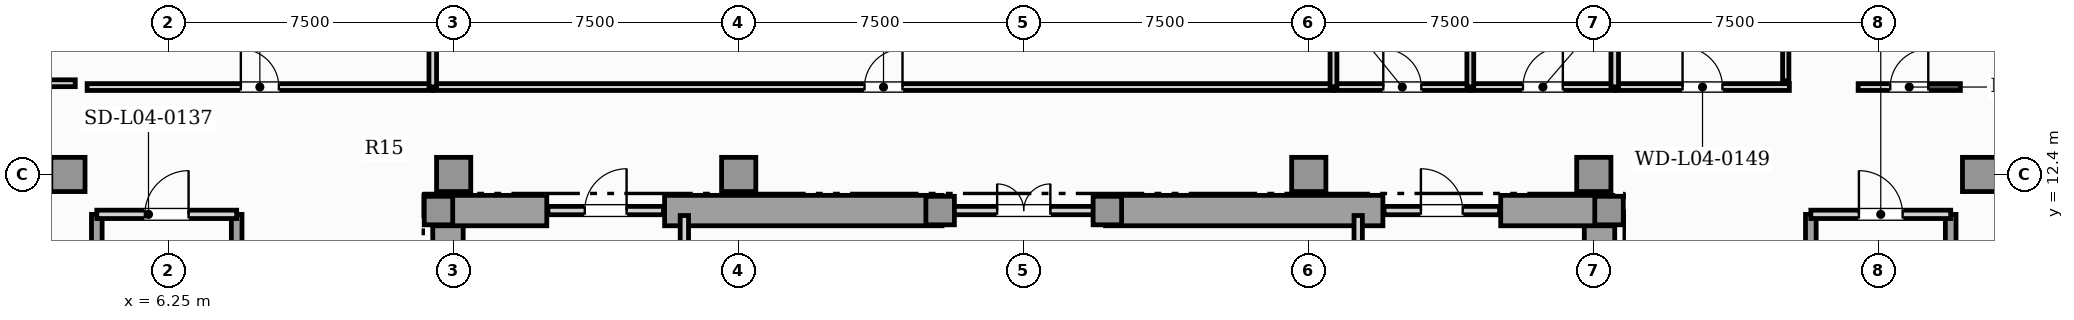
"""IFC4 building model, lengths in metres.
Left out: names, types, materials, properties, quantities, classifications, styles, units other than length and angle.
Written with IfcOpenShell. Run it as: python <this file> out.ifc"""

import sys

from ifc_helpers import new_model, si_unit, direction, frame, frame_2d, origin, origin_2d, place, context, subcontext, project, spatial, rectangle, extrude, element, fill, save


model = new_model("IFC4")
c1 = context("Model", 3, precision=1e-05, world=origin(), true_north=direction((0.0, 1.0)))
c2 = subcontext(c1, "Body", "Model", "MODEL_VIEW")
j1 = project(units=[si_unit("LENGTHUNIT", "METRE"), si_unit("PLANEANGLEUNIT", "RADIAN")], contexts=[c1])
p1 = place(None, origin())
s1 = spatial("IfcSite", under=j1, at=p1, CompositionType="ELEMENT")
p2 = place(p1, origin())
s2 = spatial("IfcBuilding", under=s1, at=p2, CompositionType="ELEMENT")
p3 = place(p2, frame((0.0, 0.0, 19.8)))
s3 = spatial("IfcBuildingStorey", under=s2, at=p3, CompositionType="ELEMENT", Elevation=19.8)
for number, where, z_axis, x_axis in (
    (1, (13.6, 0.92, 0.0), (0.0, 0.0, 1.0), (0.0, 1.0, 0.0)),
    (2, (43.9, 0.92, 0.0), (0.0, 0.0, 1.0), (0.0, 1.0, 0.0)),
):
    element("IfcWall", number, at=place(p3, frame(where, z_axis=z_axis, x_axis=x_axis)), inside=s3, PredefinedType="SHEAR", context=c2, shape_type="SweptSolid", body=[
        extrude(rectangle(XDim=10.53, YDim=0.8, at=frame_2d((5.265, 0.0))), origin(), (0.0, 0.0, 1.0), 4.4),
    ])
p4 = place(p3, frame((13.25, 11.45, 0.0), z_axis=(0.0, 0.0, 1.0), x_axis=(1.0, 0.0, 0.0)))
e3 = element("IfcWall", 3, at=p4, inside=s3, PredefinedType="SHEAR", context=c2, shape_type="SweptSolid", body=[
    extrude(rectangle(XDim=2.95, YDim=0.8, at=frame_2d((1.475, 0.0))), origin(), (0.0, 0.0, 1.0), 4.4),
])
for number, where, z_axis, x_axis in (
    (4, (19.3, 11.45, 0.0), (0.0, 0.0, 1.0), (1.0, 0.0, 0.0)),
    (5, (30.9, 11.45, 0.0), (0.0, 0.0, 1.0), (1.0, 0.0, 0.0)),
):
    element("IfcWall", number, at=place(p3, frame(where, z_axis=z_axis, x_axis=x_axis)), inside=s3, PredefinedType="SHEAR", context=c2, shape_type="SweptSolid", body=[
        extrude(rectangle(XDim=7.3, YDim=0.8, at=frame_2d((3.65, 0.0))), origin(), (0.0, 0.0, 1.0), 4.4),
    ])
p5 = place(p3, frame((41.3, 11.45, 0.0), z_axis=(0.0, 0.0, 1.0), x_axis=(1.0, 0.0, 0.0)))
e6 = element("IfcWall", 6, at=p5, inside=s3, PredefinedType="SHEAR", context=c2, shape_type="SweptSolid", body=[
    extrude(rectangle(XDim=2.95, YDim=0.8, at=frame_2d((1.475, 0.0))), origin(), (0.0, 0.0, 1.0), 4.4),
])
for number, where, z_axis, x_axis in (
    (7, (13.35, 11.45, 0.0), (0.0, 0.0, 1.0), (1.0, 0.0, 0.0)),
    (8, (44.15, 11.45, 0.0), (0.0, 0.0, 1.0), (1.0, 0.0, 0.0)),
    (9, (26.55, 11.45, 0.0), (0.0, 0.0, 1.0), (1.0, 0.0, 0.0)),
    (10, (30.95, 11.45, 0.0), (0.0, 0.0, 1.0), (1.0, 0.0, 0.0)),
):
    element("IfcColumn", number, at=place(p3, frame(where, z_axis=z_axis, x_axis=x_axis)), inside=s3, PredefinedType="COLUMN", context=c2, shape_type="SweptSolid", body=[
        extrude(rectangle(XDim=0.75, YDim=0.75, at=origin_2d()), origin(), (0.0, 0.0, 1.0), 4.8),
    ])
for number, where, z_axis, x_axis in (
    (11, (3.6, 12.4, 0.0), (0.0, 0.0, 1.0), (1.0, 0.0, 0.0)),
    (12, (13.75, 12.4, 0.0), (0.0, 0.0, 1.0), (1.0, 0.0, 0.0)),
    (13, (43.75, 12.4, 0.0), (0.0, 0.0, 1.0), (1.0, 0.0, 0.0)),
    (14, (53.9, 12.4, 0.0), (0.0, 0.0, 1.0), (1.0, 0.0, 0.0)),
    (15, (21.25, 12.4, 0.0), (0.0, 0.0, 1.0), (1.0, 0.0, 0.0)),
    (16, (36.25, 12.4, 0.0), (0.0, 0.0, 1.0), (1.0, 0.0, 0.0)),
):
    element("IfcColumn", number, at=place(p3, frame(where, z_axis=z_axis, x_axis=x_axis)), inside=s3, PredefinedType="COLUMN", context=c2, shape_type="SweptSolid", body=[
        extrude(rectangle(XDim=0.9, YDim=0.9, at=origin_2d()), origin(), (0.0, 0.0, 1.0), 4.8),
    ])
for number, where, z_axis, x_axis in (
    (17, (4.36, 3.56, 0.0), (0.0, 0.0, 1.0), (0.0, 1.0, 0.0)),
    (18, (8.04, 3.56, 0.0), (0.0, 0.0, 1.0), (0.0, 1.0, 0.0)),
):
    element("IfcWall", number, at=place(p3, frame(where, z_axis=z_axis, x_axis=x_axis)), inside=s3, PredefinedType="SHEAR", context=c2, shape_type="SweptSolid", body=[
        extrude(rectangle(XDim=7.79, YDim=0.28, at=frame_2d((3.895, 0.0))), origin(), (0.0, 0.0, 1.0), 4.4),
    ])
p6 = place(p3, frame((4.36, 11.35, 0.0), z_axis=(0.0, 0.0, 1.0), x_axis=(1.0, 0.0, 0.0)))
e19 = element("IfcWall", 19, at=p6, inside=s3, PredefinedType="SOLIDWALL", context=c2, shape_type="SweptSolid", body=[
    extrude(rectangle(XDim=3.68, YDim=0.22, at=frame_2d((1.84, 0.0))), origin(), (0.0, 0.0, 1.0), 4.4),
])
p7 = place(p6, frame((1.265, 0.0, 0.0)))
e20 = element("IfcOpeningElement", 20, at=p7, cuts=e19, PredefinedType="OPENING", context=c2, shape_type="SweptSolid", body=[
    extrude(rectangle(XDim=1.15, YDim=2.2, at=frame_2d((0.575, 1.1))), frame((0.0, 0.12, 0.0), z_axis=(0.0, -1.0, 0.0), x_axis=(1.0, 0.0, 0.0)), (0.0, 0.0, 1.0), 0.24),
])
for number, where, z_axis, x_axis in (
    (21, (49.46, 3.56, 0.0), (0.0, 0.0, 1.0), (0.0, 1.0, 0.0)),
    (22, (53.14, 3.56, 0.0), (0.0, 0.0, 1.0), (0.0, 1.0, 0.0)),
):
    element("IfcWall", number, at=place(p3, frame(where, z_axis=z_axis, x_axis=x_axis)), inside=s3, PredefinedType="SHEAR", context=c2, shape_type="SweptSolid", body=[
        extrude(rectangle(XDim=7.79, YDim=0.28, at=frame_2d((3.895, 0.0))), origin(), (0.0, 0.0, 1.0), 4.4),
    ])
p8 = place(p3, frame((49.46, 11.35, 0.0), z_axis=(0.0, 0.0, 1.0), x_axis=(1.0, 0.0, 0.0)))
e23 = element("IfcWall", 23, at=p8, inside=s3, PredefinedType="SOLIDWALL", context=c2, shape_type="SweptSolid", body=[
    extrude(rectangle(XDim=3.68, YDim=0.22, at=frame_2d((1.84, 0.0))), origin(), (0.0, 0.0, 1.0), 4.4),
])
p9 = place(p8, frame((1.265, 0.0, 0.0)))
e24 = element("IfcOpeningElement", 24, at=p9, cuts=e23, PredefinedType="OPENING", context=c2, shape_type="SweptSolid", body=[
    extrude(rectangle(XDim=1.15, YDim=2.2, at=frame_2d((0.575, 1.1))), frame((0.0, 0.12, 0.0), z_axis=(0.0, -1.0, 0.0), x_axis=(1.0, 0.0, 0.0)), (0.0, 0.0, 1.0), 0.24),
])
p10 = place(p3, frame((19.82, 8.52, 0.0), z_axis=(0.0, 0.0, 1.0), x_axis=(0.0, 1.0, 0.0)))
e25 = element("IfcWall", 25, at=p10, inside=s3, PredefinedType="SOLIDWALL", context=c2, shape_type="SweptSolid", body=[
    extrude(rectangle(XDim=2.8, YDim=0.22, at=frame_2d((1.4, 0.0))), origin(), (0.0, 0.0, 1.0), 3.855),
])
p11 = place(p10, frame((0.85, 0.0, 0.0)))
e26 = element("IfcOpeningElement", 26, at=p11, cuts=e25, PredefinedType="OPENING", context=c2, shape_type="SweptSolid", body=[
    extrude(rectangle(XDim=1.1, YDim=2.2, at=frame_2d((0.55, 1.1))), frame((0.0, 0.12, 0.0), z_axis=(0.0, -1.0, 0.0), x_axis=(1.0, 0.0, 0.0)), (0.0, 0.0, 1.0), 0.24),
])
p12 = place(p3, frame((37.55, 8.52, 0.0), z_axis=(0.0, 0.0, 1.0), x_axis=(0.0, 1.0, 0.0)))
e27 = element("IfcWall", 27, at=p12, inside=s3, PredefinedType="SOLIDWALL", context=c2, shape_type="SweptSolid", body=[
    extrude(rectangle(XDim=2.8, YDim=0.22, at=frame_2d((1.4, 0.0))), origin(), (0.0, 0.0, 1.0), 3.855),
])
p13 = place(p12, frame((0.85, 0.0, 0.0)))
e28 = element("IfcOpeningElement", 28, at=p13, cuts=e27, PredefinedType="OPENING", context=c2, shape_type="SweptSolid", body=[
    extrude(rectangle(XDim=1.1, YDim=2.2, at=frame_2d((0.55, 1.1))), frame((0.0, 0.12, 0.0), z_axis=(0.0, -1.0, 0.0), x_axis=(1.0, 0.0, 0.0)), (0.0, 0.0, 1.0), 0.24),
])
p14 = place(p3, frame((16.23, 11.45, 0.0), z_axis=(0.0, 0.0, 1.0), x_axis=(1.0, 0.0, 0.0)))
e29 = element("IfcWall", 29, at=p14, inside=s3, PredefinedType="SOLIDWALL", context=c2, shape_type="SweptSolid", body=[
    extrude(rectangle(XDim=3.04, YDim=0.22, at=frame_2d((1.52, 0.0))), origin(), (0.0, 0.0, 1.0), 4.4),
])
p15 = place(p14, frame((0.97, 0.0, 0.0)))
e30 = element("IfcOpeningElement", 30, at=p15, cuts=e29, PredefinedType="OPENING", context=c2, shape_type="SweptSolid", body=[
    extrude(rectangle(XDim=1.1, YDim=2.2, at=frame_2d((0.55, 1.1))), frame((0.0, 0.12, 0.0), z_axis=(0.0, -1.0, 0.0), x_axis=(1.0, 0.0, 0.0)), (0.0, 0.0, 1.0), 0.24),
])
p16 = place(p3, frame((26.63, 11.45, 0.0), z_axis=(0.0, 0.0, 1.0), x_axis=(1.0, 0.0, 0.0)))
e31 = element("IfcWall", 31, at=p16, inside=s3, PredefinedType="SOLIDWALL", context=c2, shape_type="SweptSolid", body=[
    extrude(rectangle(XDim=4.24, YDim=0.22, at=frame_2d((2.12, 0.0))), origin(), (0.0, 0.0, 1.0), 4.4),
])
p17 = place(p16, frame((1.42, 0.0, 0.0)))
e32 = element("IfcOpeningElement", 32, at=p17, cuts=e31, PredefinedType="OPENING", context=c2, shape_type="SweptSolid", body=[
    extrude(rectangle(XDim=1.4, YDim=2.2, at=frame_2d((0.7, 1.1))), frame((0.0, 0.12, 0.0), z_axis=(0.0, -1.0, 0.0), x_axis=(1.0, 0.0, 0.0)), (0.0, 0.0, 1.0), 0.24),
])
p18 = place(p3, frame((38.23, 11.45, 0.0), z_axis=(0.0, 0.0, 1.0), x_axis=(1.0, 0.0, 0.0)))
e33 = element("IfcWall", 33, at=p18, inside=s3, PredefinedType="SOLIDWALL", context=c2, shape_type="SweptSolid", body=[
    extrude(rectangle(XDim=3.04, YDim=0.22, at=frame_2d((1.52, 0.0))), origin(), (0.0, 0.0, 1.0), 4.4),
])
p19 = place(p18, frame((0.97, 0.0, 0.0)))
e34 = element("IfcOpeningElement", 34, at=p19, cuts=e33, PredefinedType="OPENING", context=c2, shape_type="SweptSolid", body=[
    extrude(rectangle(XDim=1.1, YDim=2.2, at=frame_2d((0.55, 1.1))), frame((0.0, 0.12, 0.0), z_axis=(0.0, -1.0, 0.0), x_axis=(1.0, 0.0, 0.0)), (0.0, 0.0, 1.0), 0.24),
])
p20 = place(p3, frame((4.105, 14.7, 0.0), z_axis=(0.0, 0.0, 1.0), x_axis=(1.0, 0.0, 0.0)))
e35 = element("IfcWall", 35, at=p20, inside=s3, PredefinedType="PARTITIONING", context=c2, shape_type="SweptSolid", body=[
    extrude(rectangle(XDim=9.09, YDim=0.18, at=frame_2d((4.545, 0.0))), origin(), (0.0, 0.0, 1.0), 4.4),
])
p21 = place(p20, frame((4.045, 0.0, 0.0)))
e36 = element("IfcOpeningElement", 36, at=p21, cuts=e35, PredefinedType="OPENING", context=c2, shape_type="SweptSolid", body=[
    extrude(rectangle(XDim=1.0, YDim=2.15, at=frame_2d((0.5, 1.075))), frame((0.0, 0.1, 0.0), z_axis=(0.0, -1.0, 0.0), x_axis=(1.0, 0.0, 0.0)), (0.0, 0.0, 1.0), 0.2),
])
p22 = place(p3, frame((13.225, 14.7, 0.0), z_axis=(0.0, 0.0, 1.0), x_axis=(1.0, 0.0, 0.0)))
e37 = element("IfcWall", 37, at=p22, inside=s3, PredefinedType="PARTITIONING", context=c2, shape_type="SweptSolid", body=[
    extrude(rectangle(XDim=23.67, YDim=0.18, at=frame_2d((11.835, 0.0))), origin(), (0.0, 0.0, 1.0), 4.4),
])
p23 = place(p22, frame((11.335, 0.0, 0.0)))
e38 = element("IfcOpeningElement", 38, at=p23, cuts=e37, PredefinedType="OPENING", context=c2, shape_type="SweptSolid", body=[
    extrude(rectangle(XDim=1.0, YDim=2.15, at=frame_2d((0.5, 1.075))), frame((0.0, 0.1, 0.0), z_axis=(0.0, -1.0, 0.0), x_axis=(1.0, 0.0, 0.0)), (0.0, 0.0, 1.0), 0.2),
])
p24 = place(p3, frame((36.925, 14.7, 0.0), z_axis=(0.0, 0.0, 1.0), x_axis=(1.0, 0.0, 0.0)))
e39 = element("IfcWall", 39, at=p24, inside=s3, PredefinedType="PARTITIONING", context=c2, shape_type="SweptSolid", body=[
    extrude(rectangle(XDim=3.57, YDim=0.18, at=frame_2d((1.785, 0.0))), origin(), (0.0, 0.0, 1.0), 4.4),
])
p25 = place(p24, frame((1.285, 0.0, 0.0)))
e40 = element("IfcOpeningElement", 40, at=p25, cuts=e39, PredefinedType="OPENING", context=c2, shape_type="SweptSolid", body=[
    extrude(rectangle(XDim=1.0, YDim=2.15, at=frame_2d((0.5, 1.075))), frame((0.0, 0.1, 0.0), z_axis=(0.0, -1.0, 0.0), x_axis=(1.0, 0.0, 0.0)), (0.0, 0.0, 1.0), 0.2),
])
p26 = place(p3, frame((40.525, 14.7, 0.0), z_axis=(0.0, 0.0, 1.0), x_axis=(1.0, 0.0, 0.0)))
e41 = element("IfcWall", 41, at=p26, inside=s3, PredefinedType="PARTITIONING", context=c2, shape_type="SweptSolid", body=[
    extrude(rectangle(XDim=3.77, YDim=0.18, at=frame_2d((1.885, 0.0))), origin(), (0.0, 0.0, 1.0), 4.4),
])
p27 = place(p26, frame((1.36, 0.0, 0.0)))
e42 = element("IfcOpeningElement", 42, at=p27, cuts=e41, PredefinedType="OPENING", context=c2, shape_type="SweptSolid", body=[
    extrude(rectangle(XDim=1.05, YDim=2.15, at=frame_2d((0.525, 1.075))), frame((0.0, 0.1, 0.0), z_axis=(0.0, -1.0, 0.0), x_axis=(1.0, 0.0, 0.0)), (0.0, 0.0, 1.0), 0.2),
])
p28 = place(p3, frame((44.325, 14.7, 0.0), z_axis=(0.0, 0.0, 1.0), x_axis=(1.0, 0.0, 0.0)))
e43 = element("IfcWall", 43, at=p28, inside=s3, PredefinedType="PARTITIONING", context=c2, shape_type="SweptSolid", body=[
    extrude(rectangle(XDim=4.57, YDim=0.18, at=frame_2d((2.285, 0.0))), origin(), (0.0, 0.0, 1.0), 4.4),
])
p29 = place(p28, frame((1.76, 0.0, 0.0)))
e44 = element("IfcOpeningElement", 44, at=p29, cuts=e43, PredefinedType="OPENING", context=c2, shape_type="SweptSolid", body=[
    extrude(rectangle(XDim=1.05, YDim=2.15, at=frame_2d((0.525, 1.075))), frame((0.0, 0.1, 0.0), z_axis=(0.0, -1.0, 0.0), x_axis=(1.0, 0.0, 0.0)), (0.0, 0.0, 1.0), 0.2),
])
p30 = place(p3, frame((50.705, 14.7, 0.0), z_axis=(0.0, 0.0, 1.0), x_axis=(1.0, 0.0, 0.0)))
e45 = element("IfcWall", 45, at=p30, inside=s3, PredefinedType="PARTITIONING", context=c2, shape_type="SweptSolid", body=[
    extrude(rectangle(XDim=2.69, YDim=0.18, at=frame_2d((1.345, 0.0))), origin(), (0.0, 0.0, 1.0), 4.4),
])
p31 = place(p30, frame((0.845, 0.0, 0.0)))
e46 = element("IfcOpeningElement", 46, at=p31, cuts=e45, PredefinedType="OPENING", context=c2, shape_type="SweptSolid", body=[
    extrude(rectangle(XDim=1.0, YDim=2.15, at=frame_2d((0.5, 1.075))), frame((0.0, 0.1, 0.0), z_axis=(0.0, -1.0, 0.0), x_axis=(1.0, 0.0, 0.0)), (0.0, 0.0, 1.0), 0.2),
])
p32 = place(p3, frame((13.2, 14.705, 0.0), z_axis=(0.0, 0.0, 1.0), x_axis=(0.0, 1.0, 0.0)))
e47 = element("IfcWall", 47, at=p32, inside=s3, PredefinedType="PARTITIONING", context=c2, shape_type="SweptSolid", body=[
    extrude(rectangle(XDim=27.08, YDim=0.2, at=frame_2d((13.54, 0.0))), origin(), (0.0, 0.0, 1.0), 4.4),
])
p33 = place(p3, frame((36.9, 14.705, 0.0), z_axis=(0.0, 0.0, 1.0), x_axis=(0.0, 1.0, 0.0)))
e48 = element("IfcWall", 48, at=p33, inside=s3, PredefinedType="PARTITIONING", context=c2, shape_type="SweptSolid", body=[
    extrude(rectangle(XDim=16.59, YDim=0.18, at=frame_2d((8.295, 0.0))), origin(), (0.0, 0.0, 1.0), 4.4),
])
p34 = place(p33, frame((5.306, 0.0, 0.0)))
e49 = element("IfcOpeningElement", 49, at=p34, cuts=e48, PredefinedType="OPENING", context=c2, shape_type="SweptSolid", body=[
    extrude(rectangle(XDim=1.0, YDim=2.15, at=frame_2d((0.5, 1.075))), frame((0.0, 0.1, 0.0), z_axis=(0.0, -1.0, 0.0), x_axis=(1.0, 0.0, 0.0)), (0.0, 0.0, 1.0), 0.2),
])
p35 = place(p3, frame((40.5, 14.705, 0.0), z_axis=(0.0, 0.0, 1.0), x_axis=(0.0, 1.0, 0.0)))
e50 = element("IfcWall", 50, at=p35, inside=s3, PredefinedType="PARTITIONING", context=c2, shape_type="SweptSolid", body=[
    extrude(rectangle(XDim=8.19, YDim=0.18, at=frame_2d((4.095, 0.0))), origin(), (0.0, 0.0, 1.0), 4.4),
])
p36 = place(p35, frame((3.57, 0.0, 0.0)))
e51 = element("IfcOpeningElement", 51, at=p36, cuts=e50, PredefinedType="OPENING", context=c2, shape_type="SweptSolid", body=[
    extrude(rectangle(XDim=1.05, YDim=2.15, at=frame_2d((0.525, 1.075))), frame((0.0, 0.1, 0.0), z_axis=(0.0, -1.0, 0.0), x_axis=(1.0, 0.0, 0.0)), (0.0, 0.0, 1.0), 0.2),
])
p37 = place(p3, frame((44.3, 14.705, 0.0), z_axis=(0.0, 0.0, 1.0), x_axis=(0.0, 1.0, 0.0)))
e52 = element("IfcWall", 52, at=p37, inside=s3, PredefinedType="PARTITIONING", context=c2, shape_type="SweptSolid", body=[
    extrude(rectangle(XDim=4.59, YDim=0.2, at=frame_2d((2.295, 0.0))), origin(), (0.0, 0.0, 1.0), 4.4),
])
p38 = place(p3, frame((-1.895, 14.8, 0.0), z_axis=(0.0, 0.0, 1.0), x_axis=(1.0, 0.0, 0.0)))
e53 = element("IfcWall", 53, at=p38, inside=s3, PredefinedType="PARTITIONING", context=c2, shape_type="SweptSolid", body=[
    extrude(rectangle(XDim=5.688, YDim=0.18, at=frame_2d((2.844, 0.0))), origin(), (0.0, 0.0, 1.0), 4.4),
])
p39 = place(p3, frame((48.8, 14.865, 0.0), z_axis=(0.0, 0.0, 1.0), x_axis=(0.0, 1.0, 0.0)))
e54 = element("IfcWall", 54, at=p39, inside=s3, PredefinedType="PLUMBINGWALL", context=c2, shape_type="SweptSolid", body=[
    extrude(rectangle(XDim=4.43, YDim=0.165, at=frame_2d((2.215, 0.0))), origin(), (0.0, 0.0, 1.0), 4.4),
])
p40 = place(p7, origin())
e55 = element("IfcDoor", 55, at=p40, inside=s3, OperationType="SINGLE_SWING_RIGHT", PredefinedType="DOOR", context=c2, shape_type="SweptSolid", body=[
    extrude(rectangle(XDim=1.15, YDim=2.2, at=frame_2d((0.575, 1.1))), frame((0.0, 0.025, 0.0), z_axis=(0.0, -1.0, 0.0), x_axis=(1.0, 0.0, 0.0)), (0.0, 0.0, 1.0), 0.05),
])
fill(e20, e55)
p41 = place(p9, origin())
e56 = element("IfcDoor", 56, at=p41, inside=s3, OperationType="SINGLE_SWING_LEFT", PredefinedType="DOOR", context=c2, shape_type="SweptSolid", body=[
    extrude(rectangle(XDim=1.15, YDim=2.2, at=frame_2d((0.575, 1.1))), frame((0.0, 0.025, 0.0), z_axis=(0.0, -1.0, 0.0), x_axis=(1.0, 0.0, 0.0)), (0.0, 0.0, 1.0), 0.05),
])
fill(e24, e56)
p42 = place(p15, origin())
e57 = element("IfcDoor", 57, at=p42, inside=s3, OperationType="SINGLE_SWING_RIGHT", PredefinedType="DOOR", context=c2, shape_type="SweptSolid", body=[
    extrude(rectangle(XDim=1.1, YDim=2.2, at=frame_2d((0.55, 1.1))), frame((0.0, 0.025, 0.0), z_axis=(0.0, -1.0, 0.0), x_axis=(1.0, 0.0, 0.0)), (0.0, 0.0, 1.0), 0.05),
])
fill(e30, e57)
p43 = place(p17, origin())
e58 = element("IfcDoor", 58, at=p43, inside=s3, OperationType="DOUBLE_DOOR_SINGLE_SWING", PredefinedType="DOOR", context=c2, shape_type="SweptSolid", body=[
    extrude(rectangle(XDim=1.4, YDim=2.2, at=frame_2d((0.7, 1.1))), frame((0.0, 0.025, 0.0), z_axis=(0.0, -1.0, 0.0), x_axis=(1.0, 0.0, 0.0)), (0.0, 0.0, 1.0), 0.05),
])
fill(e32, e58)
p44 = place(p19, origin())
e59 = element("IfcDoor", 59, at=p44, inside=s3, OperationType="SINGLE_SWING_LEFT", PredefinedType="DOOR", context=c2, shape_type="SweptSolid", body=[
    extrude(rectangle(XDim=1.1, YDim=2.2, at=frame_2d((0.55, 1.1))), frame((0.0, 0.025, 0.0), z_axis=(0.0, -1.0, 0.0), x_axis=(1.0, 0.0, 0.0)), (0.0, 0.0, 1.0), 0.05),
])
fill(e34, e59)
p45 = place(p21, origin())
e60 = element("IfcDoor", 60, at=p45, inside=s3, OperationType="SINGLE_SWING_LEFT", PredefinedType="DOOR", context=c2, shape_type="SweptSolid", body=[
    extrude(rectangle(XDim=1.0, YDim=2.15, at=frame_2d((0.5, 1.075))), frame((0.0, 0.025, 0.0), z_axis=(0.0, -1.0, 0.0), x_axis=(1.0, 0.0, 0.0)), (0.0, 0.0, 1.0), 0.05),
])
fill(e36, e60)
p46 = place(p23, origin())
e61 = element("IfcDoor", 61, at=p46, inside=s3, OperationType="SINGLE_SWING_RIGHT", PredefinedType="DOOR", context=c2, shape_type="SweptSolid", body=[
    extrude(rectangle(XDim=1.0, YDim=2.15, at=frame_2d((0.5, 1.075))), frame((0.0, 0.025, 0.0), z_axis=(0.0, -1.0, 0.0), x_axis=(1.0, 0.0, 0.0)), (0.0, 0.0, 1.0), 0.05),
])
fill(e38, e61)
p47 = place(p25, origin())
e62 = element("IfcDoor", 62, at=p47, inside=s3, OperationType="SINGLE_SWING_LEFT", PredefinedType="DOOR", context=c2, shape_type="SweptSolid", body=[
    extrude(rectangle(XDim=1.0, YDim=2.15, at=frame_2d((0.5, 1.075))), frame((0.0, 0.025, 0.0), z_axis=(0.0, -1.0, 0.0), x_axis=(1.0, 0.0, 0.0)), (0.0, 0.0, 1.0), 0.05),
])
fill(e40, e62)
p48 = place(p27, origin())
e63 = element("IfcDoor", 63, at=p48, inside=s3, OperationType="SINGLE_SWING_RIGHT", PredefinedType="DOOR", context=c2, shape_type="SweptSolid", body=[
    extrude(rectangle(XDim=1.05, YDim=2.15, at=frame_2d((0.525, 1.075))), frame((0.0, 0.025, 0.0), z_axis=(0.0, -1.0, 0.0), x_axis=(1.0, 0.0, 0.0)), (0.0, 0.0, 1.0), 0.05),
])
fill(e42, e63)
p49 = place(p29, origin())
e64 = element("IfcDoor", 64, at=p49, inside=s3, OperationType="SINGLE_SWING_LEFT", PredefinedType="DOOR", context=c2, shape_type="SweptSolid", body=[
    extrude(rectangle(XDim=1.05, YDim=2.15, at=frame_2d((0.525, 1.075))), frame((0.0, 0.025, 0.0), z_axis=(0.0, -1.0, 0.0), x_axis=(1.0, 0.0, 0.0)), (0.0, 0.0, 1.0), 0.05),
])
fill(e44, e64)
p50 = place(p31, origin())
e65 = element("IfcDoor", 65, at=p50, inside=s3, OperationType="SINGLE_SWING_RIGHT", PredefinedType="DOOR", context=c2, shape_type="SweptSolid", body=[
    extrude(rectangle(XDim=1.0, YDim=2.15, at=frame_2d((0.5, 1.075))), frame((0.0, 0.025, 0.0), z_axis=(0.0, -1.0, 0.0), x_axis=(1.0, 0.0, 0.0)), (0.0, 0.0, 1.0), 0.05),
])
fill(e46, e65)
save(model, sys.argv[1])
